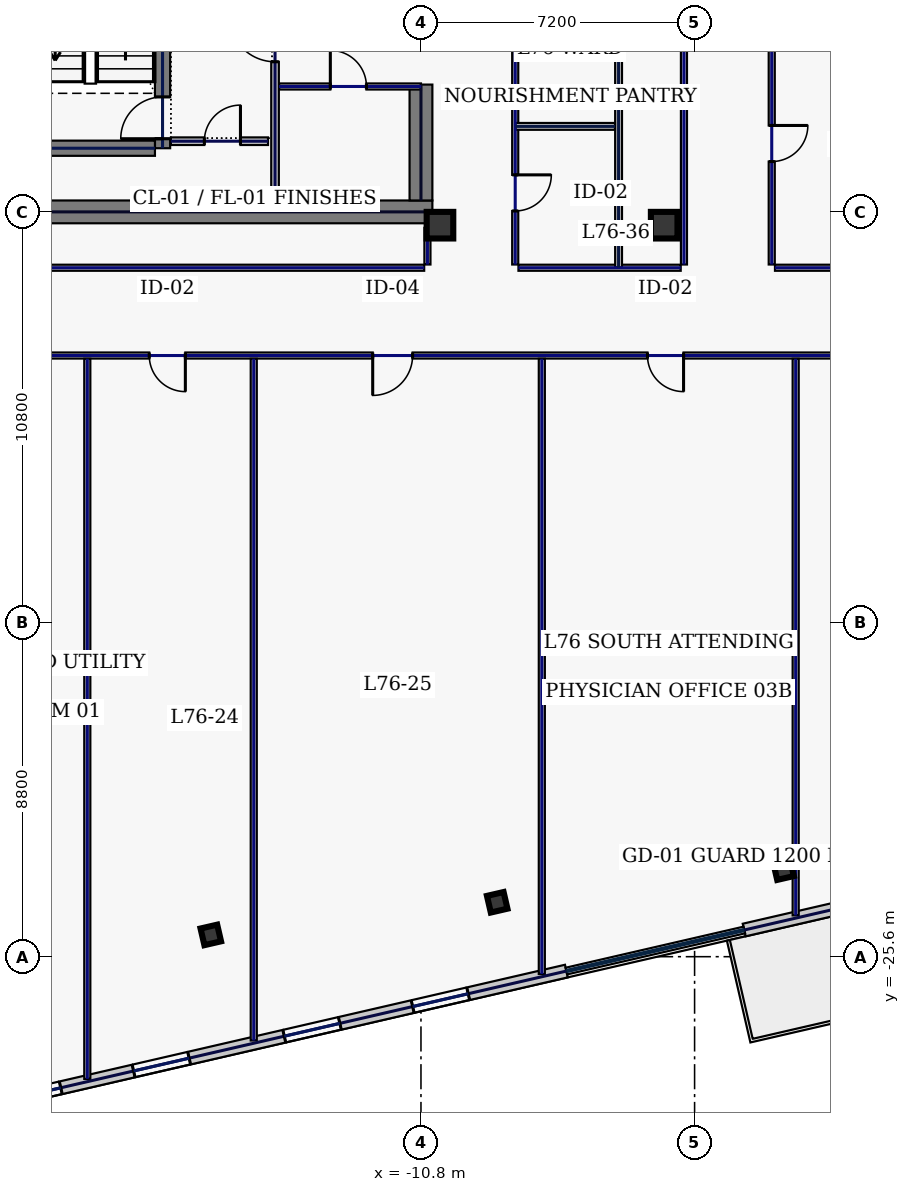
"""IFC4 building model, lengths in metres.
Left out: names, types, materials, properties, quantities, classifications, styles, units other than length and angle.
Written with IfcOpenShell. Run it as: python <this file> out.ifc"""

import sys

from ifc_helpers import new_model, si_unit, direction, frame, frame_2d, origin, origin_2d, place, context, subcontext, project, spatial, rectangle, hollow_rectangle, extrude, element, fill, save


model = new_model("IFC4")
c1 = context("Model", 3, precision=1e-05, world=origin(), true_north=direction((0.0, 1.0)))
c2 = subcontext(c1, "Body", "Model", "MODEL_VIEW")
j1 = project(units=[si_unit("LENGTHUNIT", "METRE"), si_unit("PLANEANGLEUNIT", "RADIAN")], contexts=[c1])
p1 = place(None, origin())
s1 = spatial("IfcSite", under=j1, at=p1, CompositionType="ELEMENT")
p2 = place(p1, origin())
s2 = spatial("IfcBuilding", under=s1, at=p2, CompositionType="ELEMENT")
p3 = place(p2, frame((0.0, 0.0, 325.0)))
s3 = spatial("IfcBuildingStorey", under=s2, at=p3, CompositionType="ELEMENT", Elevation=325.0)
p4 = place(p3, frame((-22.0, -6.0, 0.0), z_axis=(0.0, 0.0, 1.0), x_axis=(1.0, 0.0, 0.0)))
e1 = element("IfcWall", 1, at=p4, inside=s3, PredefinedType="SHEAR", context=c2, shape_type="SweptSolid", body=[
    extrude(rectangle(XDim=11.5, YDim=0.6, at=frame_2d((5.75, 0.0))), origin(), (0.0, 0.0, 1.0), 3.74),
])
p5 = place(p3, frame((-10.8, -5.7, 0.0), z_axis=(0.0, 0.0, 1.0), x_axis=(0.0, 1.0, 0.0)))
e2 = element("IfcWall", 2, at=p5, inside=s3, PredefinedType="SHEAR", context=c2, shape_type="SweptSolid", body=[
    extrude(rectangle(XDim=3.05, YDim=0.6, at=frame_2d((1.525, 0.0))), origin(), (0.0, 0.0, 1.0), 3.74),
])
p6 = place(p3, frame((-17.6, -4.325, 0.0), z_axis=(0.0, 0.0, 1.0), x_axis=(0.0, 1.0, 0.0)))
e3 = element("IfcWall", 3, at=p6, inside=s3, PredefinedType="SHEAR", context=c2, shape_type="SweptSolid", body=[
    extrude(rectangle(XDim=8.65, YDim=0.4, at=frame_2d((4.325, 0.0))), origin(), (0.0, 0.0, 1.0), 3.74),
])
p7 = place(p6, frame((0.25, 0.0, 0.0)))
e4 = element("IfcOpeningElement", 4, at=p7, cuts=e3, PredefinedType="OPENING", context=c2, shape_type="SweptSolid", body=[
    extrude(rectangle(XDim=1.1, YDim=2.2, at=frame_2d((0.55, 1.1))), frame((0.0, 0.21, 0.0), z_axis=(0.0, -1.0, 0.0), x_axis=(1.0, 0.0, 0.0)), (0.0, 0.0, 1.0), 0.42),
])
p8 = place(p3, frame((-21.2, -4.325, 0.0), z_axis=(0.0, 0.0, 1.0), x_axis=(1.0, 0.0, 0.0)))
e5 = element("IfcWall", 5, at=p8, inside=s3, PredefinedType="SHEAR", context=c2, shape_type="SweptSolid", body=[
    extrude(rectangle(XDim=3.4, YDim=0.4, at=frame_2d((1.7, 0.0))), origin(), (0.0, 0.0, 1.0), 3.74),
])
for number, where, z_axis, x_axis in (
    (6, (-10.3, -6.35, 0.0), (0.0, 0.0, 1.0), (1.0, 0.0, 0.0)),
    (7, (-4.4, -6.35, 0.0), (0.0, 0.0, 1.0), (1.0, 0.0, 0.0)),
):
    element("IfcColumn", number, at=place(p3, frame(where, z_axis=z_axis, x_axis=x_axis)), inside=s3, PredefinedType="COLUMN", context=c2, shape_type="SweptSolid", body=[
        extrude(hollow_rectangle(XDim=0.7, YDim=0.7, WallThickness=0.032, at=origin_2d()), origin(), (0.0, 0.0, 1.0), 3.74),
    ])
for number, where, z_axis, x_axis in (
    (8, (-16.33, -25.027, 0.0), (0.0, 0.0, 1.0), (0.974, 0.225, 0.0)),
    (9, (-8.794, -24.168, 0.0), (0.0, 0.0, 1.0), (0.974, 0.225, 0.0)),
    (10, (-1.258, -23.31, 0.0), (0.0, 0.0, 1.0), (0.974, 0.225, 0.0)),
):
    element("IfcColumn", number, at=place(p3, frame(where, z_axis=z_axis, x_axis=x_axis)), inside=s3, PredefinedType="COLUMN", context=c2, shape_type="SweptSolid", body=[
        extrude(hollow_rectangle(XDim=0.45, YDim=0.45, WallThickness=0.022, at=origin_2d()), origin(), (0.0, 0.0, 1.0), 3.74),
    ])
p9 = place(p3, frame((-24.03, -29.916, 0.0), z_axis=(0.0, 0.0, 1.0), x_axis=(0.974370978061, 0.224947098473, 0.0)))
e11 = element("IfcWall", 11, at=p9, inside=s3, PredefinedType="STANDARD", context=c2, shape_type="SweptSolid", body=[
    extrude(rectangle(XDim=17.506, YDim=0.34, at=frame_2d((8.753, 0.0))), origin(), (0.0, 0.0, 1.0), 3.74),
])
p10 = place(p9, frame((2.35, 0.0, 0.9)))
e12 = element("IfcOpeningElement", 12, at=p10, cuts=e11, PredefinedType="OPENING", context=c2, shape_type="SweptSolid", body=[
    extrude(rectangle(XDim=1.5, YDim=2.0, at=frame_2d((0.75, 1.0))), frame((0.0, 0.18, 0.0), z_axis=(0.0, -1.0, 0.0), x_axis=(1.0, 0.0, 0.0)), (0.0, 0.0, 1.0), 0.36),
])
p11 = place(p9, frame((5.817, 0.0, 0.9)))
e13 = element("IfcOpeningElement", 13, at=p11, cuts=e11, PredefinedType="OPENING", context=c2, shape_type="SweptSolid", body=[
    extrude(rectangle(XDim=1.5, YDim=2.0, at=frame_2d((0.75, 1.0))), frame((0.0, 0.18, 0.0), z_axis=(0.0, -1.0, 0.0), x_axis=(1.0, 0.0, 0.0)), (0.0, 0.0, 1.0), 0.36),
])
p12 = place(p9, frame((9.886, 0.0, 0.9)))
e14 = element("IfcOpeningElement", 14, at=p12, cuts=e11, PredefinedType="OPENING", context=c2, shape_type="SweptSolid", body=[
    extrude(rectangle(XDim=1.5, YDim=2.0, at=frame_2d((0.75, 1.0))), frame((0.0, 0.18, 0.0), z_axis=(0.0, -1.0, 0.0), x_axis=(1.0, 0.0, 0.0)), (0.0, 0.0, 1.0), 0.36),
])
p13 = place(p9, frame((13.353, 0.0, 0.9)))
e15 = element("IfcOpeningElement", 15, at=p13, cuts=e11, PredefinedType="OPENING", context=c2, shape_type="SweptSolid", body=[
    extrude(rectangle(XDim=1.5, YDim=2.0, at=frame_2d((0.75, 1.0))), frame((0.0, 0.18, 0.0), z_axis=(0.0, -1.0, 0.0), x_axis=(1.0, 0.0, 0.0)), (0.0, 0.0, 1.0), 0.36),
])
p14 = place(p3, frame((-2.295, -24.898, 0.0), z_axis=(0.0, 0.0, 1.0), x_axis=(0.974370872906, 0.224947553958, 0.0)))
e16 = element("IfcWall", 16, at=p14, inside=s3, PredefinedType="STANDARD", context=c2, shape_type="SweptSolid", body=[
    extrude(rectangle(XDim=10.328, YDim=0.34, at=frame_2d((5.164, 0.0))), origin(), (0.0, 0.0, 1.0), 3.74),
])
p15 = place(p14, frame((4.394, 0.0, 0.0)))
e17 = element("IfcOpeningElement", 17, at=p15, cuts=e16, PredefinedType="OPENING", context=c2, shape_type="SweptSolid", body=[
    extrude(rectangle(XDim=1.4, YDim=2.2, at=frame_2d((0.7, 1.1))), frame((0.0, 0.18, 0.0), z_axis=(0.0, -1.0, 0.0), x_axis=(1.0, 0.0, 0.0)), (0.0, 0.0, 1.0), 0.36),
])
p16 = place(p14, frame((2.655, 0.0, 0.9)))
e18 = element("IfcOpeningElement", 18, at=p16, cuts=e16, PredefinedType="OPENING", context=c2, shape_type="SweptSolid", body=[
    extrude(rectangle(XDim=0.85, YDim=1.85, at=frame_2d((0.425, 0.925))), frame((0.0, 0.18, 0.0), z_axis=(0.0, -1.0, 0.0), x_axis=(1.0, 0.0, 0.0)), (0.0, 0.0, 1.0), 0.36),
])
p17 = place(p14, frame((6.774, 0.0, 0.9)))
e19 = element("IfcOpeningElement", 19, at=p17, cuts=e16, PredefinedType="OPENING", context=c2, shape_type="SweptSolid", body=[
    extrude(rectangle(XDim=0.85, YDim=1.85, at=frame_2d((0.425, 0.925))), frame((0.0, 0.18, 0.0), z_axis=(0.0, -1.0, 0.0), x_axis=(1.0, 0.0, 0.0)), (0.0, 0.0, 1.0), 0.36),
])
p18 = place(p3, frame((-17.38, -4.14, 0.0), z_axis=(0.0, 0.0, 1.0), x_axis=(1.0, 0.0, 0.0)))
e20 = element("IfcWall", 20, at=p18, inside=s3, PredefinedType="SOLIDWALL", context=c2, shape_type="SweptSolid", body=[
    extrude(rectangle(XDim=2.555, YDim=0.2, at=frame_2d((1.277, 0.0))), origin(), (0.0, 0.0, 1.0), 3.74),
])
p19 = place(p18, frame((0.88, 0.0, 0.0)))
e21 = element("IfcOpeningElement", 21, at=p19, cuts=e20, PredefinedType="OPENING", context=c2, shape_type="SweptSolid", body=[
    extrude(rectangle(XDim=0.95, YDim=2.2, at=frame_2d((0.475, 1.1))), frame((0.0, 0.11, 0.0), z_axis=(0.0, -1.0, 0.0), x_axis=(1.0, 0.0, 0.0)), (0.0, 0.0, 1.0), 0.22),
])
p20 = place(p3, frame((-14.535, -2.7, 0.0), z_axis=(0.0, 0.0, 1.0), x_axis=(1.0, 0.0, 0.0)))
e22 = element("IfcWall", 22, at=p20, inside=s3, PredefinedType="PARTITIONING", context=c2, shape_type="SweptSolid", body=[
    extrude(rectangle(XDim=3.735, YDim=0.16, at=frame_2d((1.867, 0.0))), origin(), (0.0, 0.0, 1.0), 3.74),
])
p21 = place(p20, frame((1.35, 0.0, 0.0)))
e23 = element("IfcOpeningElement", 23, at=p21, cuts=e22, PredefinedType="OPENING", context=c2, shape_type="SweptSolid", body=[
    extrude(rectangle(XDim=0.95, YDim=2.2, at=frame_2d((0.475, 1.1))), frame((0.0, 0.09, 0.0), z_axis=(0.0, -1.0, 0.0), x_axis=(1.0, 0.0, 0.0)), (0.0, 0.0, 1.0), 0.18),
])
p22 = place(p3, frame((-14.64, -5.56, 0.0), z_axis=(0.0, 0.0, 1.0), x_axis=(0.0, 1.0, 0.0)))
e24 = element("IfcWall", 24, at=p22, inside=s3, PredefinedType="SOLIDWALL", context=c2, shape_type="SweptSolid", body=[
    extrude(rectangle(XDim=5.6, YDim=0.2, at=frame_2d((2.8, 0.0))), origin(), (0.0, 0.0, 1.0), 3.74),
])
p23 = place(p22, frame((3.51, 0.0, 0.0)))
e25 = element("IfcOpeningElement", 25, at=p23, cuts=e24, PredefinedType="OPENING", context=c2, shape_type="SweptSolid", body=[
    extrude(rectangle(XDim=1.2, YDim=2.2, at=frame_2d((0.6, 1.1))), frame((0.0, 0.11, 0.0), z_axis=(0.0, -1.0, 0.0), x_axis=(1.0, 0.0, 0.0)), (0.0, 0.0, 1.0), 0.22),
])
p24 = place(p3, frame((12.535, -9.78, 0.0), z_axis=(0.0, 0.0, 1.0), x_axis=(-1.0, 0.0, 0.0)))
e26 = element("IfcWall", 26, at=p24, inside=s3, PredefinedType="PARTITIONING", context=c2, shape_type="SweptSolid", body=[
    extrude(rectangle(XDim=36.68, YDim=0.16, at=frame_2d((18.34, 0.0))), origin(), (0.0, 0.0, 1.0), 3.74),
])
p25 = place(p24, frame((33.856, 0.0, 0.0)))
e27 = element("IfcOpeningElement", 27, at=p25, cuts=e26, PredefinedType="OPENING", context=c2, shape_type="SweptSolid", body=[
    extrude(rectangle(XDim=1.15, YDim=2.2, at=frame_2d((0.575, 1.1))), frame((0.0, 0.09, 0.0), z_axis=(0.0, -1.0, 0.0), x_axis=(1.0, 0.0, 0.0)), (0.0, 0.0, 1.0), 0.18),
])
p26 = place(p24, frame((29.535, 0.0, 0.0)))
e28 = element("IfcOpeningElement", 28, at=p26, cuts=e26, PredefinedType="OPENING", context=c2, shape_type="SweptSolid", body=[
    extrude(rectangle(XDim=0.95, YDim=2.2, at=frame_2d((0.475, 1.1))), frame((0.0, 0.09, 0.0), z_axis=(0.0, -1.0, 0.0), x_axis=(1.0, 0.0, 0.0)), (0.0, 0.0, 1.0), 0.18),
])
p27 = place(p24, frame((23.555, 0.0, 0.0)))
e29 = element("IfcOpeningElement", 29, at=p27, cuts=e26, PredefinedType="OPENING", context=c2, shape_type="SweptSolid", body=[
    extrude(rectangle(XDim=1.05, YDim=2.2, at=frame_2d((0.525, 1.1))), frame((0.0, 0.09, 0.0), z_axis=(0.0, -1.0, 0.0), x_axis=(1.0, 0.0, 0.0)), (0.0, 0.0, 1.0), 0.18),
])
p28 = place(p24, frame((16.425, 0.0, 0.0)))
e30 = element("IfcOpeningElement", 30, at=p28, cuts=e26, PredefinedType="OPENING", context=c2, shape_type="SweptSolid", body=[
    extrude(rectangle(XDim=0.95, YDim=2.2, at=frame_2d((0.475, 1.1))), frame((0.0, 0.09, 0.0), z_axis=(0.0, -1.0, 0.0), x_axis=(1.0, 0.0, 0.0)), (0.0, 0.0, 1.0), 0.18),
])
p29 = place(p24, frame((9.385, 0.0, 0.0)))
e31 = element("IfcOpeningElement", 31, at=p29, cuts=e26, PredefinedType="OPENING", context=c2, shape_type="SweptSolid", body=[
    extrude(rectangle(XDim=0.95, YDim=2.2, at=frame_2d((0.475, 1.1))), frame((0.0, 0.09, 0.0), z_axis=(0.0, -1.0, 0.0), x_axis=(1.0, 0.0, 0.0)), (0.0, 0.0, 1.0), 0.18),
])
p30 = place(p24, frame((2.624, 0.0, 0.0)))
e32 = element("IfcOpeningElement", 32, at=p30, cuts=e26, PredefinedType="OPENING", context=c2, shape_type="SweptSolid", body=[
    extrude(rectangle(XDim=1.3, YDim=2.2, at=frame_2d((0.65, 1.1))), frame((0.0, 0.09, 0.0), z_axis=(0.0, -1.0, 0.0), x_axis=(1.0, 0.0, 0.0)), (0.0, 0.0, 1.0), 0.18),
])
p31 = place(p3, frame((-1.57, 7.435, 0.0), z_axis=(0.0, 0.0, 1.0), x_axis=(0.0, -1.0, 0.0)))
e33 = element("IfcWall", 33, at=p31, inside=s3, PredefinedType="PARTITIONING", context=c2, shape_type="SweptSolid", body=[
    extrude(rectangle(XDim=14.82, YDim=0.16, at=frame_2d((7.41, 0.0))), origin(), (0.0, 0.0, 1.0), 3.74),
])
p32 = place(p31, frame((11.161, 0.0, 0.0)))
e34 = element("IfcOpeningElement", 34, at=p32, cuts=e33, PredefinedType="OPENING", context=c2, shape_type="SweptSolid", body=[
    extrude(rectangle(XDim=0.95, YDim=2.2, at=frame_2d((0.475, 1.1))), frame((0.0, 0.09, 0.0), z_axis=(0.0, -1.0, 0.0), x_axis=(1.0, 0.0, 0.0)), (0.0, 0.0, 1.0), 0.18),
])
p33 = place(p31, frame((4.054, 0.0, 0.0)))
e35 = element("IfcOpeningElement", 35, at=p33, cuts=e33, PredefinedType="OPENING", context=c2, shape_type="SweptSolid", body=[
    extrude(rectangle(XDim=0.95, YDim=2.2, at=frame_2d((0.475, 1.1))), frame((0.0, 0.09, 0.0), z_axis=(0.0, -1.0, 0.0), x_axis=(1.0, 0.0, 0.0)), (0.0, 0.0, 1.0), 0.18),
])
p34 = place(p3, frame((-1.485, -7.47, 0.0), z_axis=(0.0, 0.0, 1.0), x_axis=(1.0, 0.0, 0.0)))
e36 = element("IfcWall", 36, at=p34, inside=s3, PredefinedType="PARTITIONING", context=c2, shape_type="SweptSolid", body=[
    extrude(rectangle(XDim=9.72, YDim=0.16, at=frame_2d((4.86, 0.0))), origin(), (0.0, 0.0, 1.0), 3.74),
])
p35 = place(p34, frame((7.561, 0.0, 0.0)))
e37 = element("IfcOpeningElement", 37, at=p35, cuts=e36, PredefinedType="OPENING", context=c2, shape_type="SweptSolid", body=[
    extrude(rectangle(XDim=0.95, YDim=2.2, at=frame_2d((0.475, 1.1))), frame((0.0, 0.09, 0.0), z_axis=(0.0, -1.0, 0.0), x_axis=(1.0, 0.0, 0.0)), (0.0, 0.0, 1.0), 0.18),
])
p36 = place(p3, frame((-3.88, -7.385, 0.0), z_axis=(0.0, 0.0, 1.0), x_axis=(0.0, 1.0, 0.0)))
e38 = element("IfcWall", 38, at=p36, inside=s3, PredefinedType="PARTITIONING", context=c2, shape_type="SweptSolid", body=[
    extrude(rectangle(XDim=14.82, YDim=0.16, at=frame_2d((7.41, 0.0))), origin(), (0.0, 0.0, 1.0), 3.74),
])
p37 = place(p3, frame((-8.32, 7.435, 0.0), z_axis=(0.0, 0.0, 1.0), x_axis=(0.0, -1.0, 0.0)))
e39 = element("IfcWall", 39, at=p37, inside=s3, PredefinedType="PARTITIONING", context=c2, shape_type="SweptSolid", body=[
    extrude(rectangle(XDim=14.82, YDim=0.16, at=frame_2d((7.41, 0.0))), origin(), (0.0, 0.0, 1.0), 3.74),
])
p38 = place(p37, frame((12.461, 0.0, 0.0)))
e40 = element("IfcOpeningElement", 40, at=p38, cuts=e39, PredefinedType="OPENING", context=c2, shape_type="SweptSolid", body=[
    extrude(rectangle(XDim=0.95, YDim=2.2, at=frame_2d((0.475, 1.1))), frame((0.0, 0.09, 0.0), z_axis=(0.0, -1.0, 0.0), x_axis=(1.0, 0.0, 0.0)), (0.0, 0.0, 1.0), 0.18),
])
p39 = place(p37, frame((5.354, 0.0, 0.0)))
e41 = element("IfcOpeningElement", 41, at=p39, cuts=e39, PredefinedType="OPENING", context=c2, shape_type="SweptSolid", body=[
    extrude(rectangle(XDim=0.95, YDim=2.2, at=frame_2d((0.475, 1.1))), frame((0.0, 0.09, 0.0), z_axis=(0.0, -1.0, 0.0), x_axis=(1.0, 0.0, 0.0)), (0.0, 0.0, 1.0), 0.18),
])
p40 = place(p3, frame((-8.235, -7.47, 0.0), z_axis=(0.0, 0.0, 1.0), x_axis=(1.0, 0.0, 0.0)))
e42 = element("IfcWall", 42, at=p40, inside=s3, PredefinedType="PARTITIONING", context=c2, shape_type="SweptSolid", body=[
    extrude(rectangle(XDim=4.27, YDim=0.16, at=frame_2d((2.135, 0.0))), origin(), (0.0, 0.0, 1.0), 3.74),
])
p41 = place(p3, frame((-10.63, -7.385, 0.0), z_axis=(0.0, 0.0, 1.0), x_axis=(0.0, 1.0, 0.0)))
e43 = element("IfcWall", 43, at=p41, inside=s3, PredefinedType="PARTITIONING", context=c2, shape_type="SweptSolid", body=[
    extrude(rectangle(XDim=0.965, YDim=0.16, at=frame_2d((0.482, 0.0))), origin(), (0.0, 0.0, 1.0), 3.74),
])
p42 = place(p3, frame((-21.915, -7.47, 0.0), z_axis=(0.0, 0.0, 1.0), x_axis=(1.0, 0.0, 0.0)))
e44 = element("IfcWall", 44, at=p42, inside=s3, PredefinedType="PARTITIONING", context=c2, shape_type="SweptSolid", body=[
    extrude(rectangle(XDim=11.2, YDim=0.16, at=frame_2d((5.6, 0.0))), origin(), (0.0, 0.0, 1.0), 3.74),
])
p43 = place(p3, frame((-19.58, -28.817, 0.0), z_axis=(0.0, 0.0, 1.0), x_axis=(0.0, 1.0, 0.0)))
e45 = element("IfcWall", 45, at=p43, inside=s3, PredefinedType="PARTITIONING", context=c2, shape_type="SweptSolid", body=[
    extrude(rectangle(XDim=18.952, YDim=0.16, at=frame_2d((9.476, 0.0))), origin(), (0.0, 0.0, 1.0), 3.74),
])
p44 = place(p3, frame((-15.2, -27.806, 0.0), z_axis=(0.0, 0.0, 1.0), x_axis=(0.0, 1.0, 0.0)))
e46 = element("IfcWall", 46, at=p44, inside=s3, PredefinedType="PARTITIONING", context=c2, shape_type="SweptSolid", body=[
    extrude(rectangle(XDim=17.941, YDim=0.16, at=frame_2d((8.97, 0.0))), origin(), (0.0, 0.0, 1.0), 3.74),
])
p45 = place(p3, frame((-0.94, -24.514, 0.0), z_axis=(0.0, 0.0, 1.0), x_axis=(0.0, 1.0, 0.0)))
e47 = element("IfcWall", 47, at=p45, inside=s3, PredefinedType="PARTITIONING", context=c2, shape_type="SweptSolid", body=[
    extrude(rectangle(XDim=14.649, YDim=0.16, at=frame_2d((7.324, 0.0))), origin(), (0.0, 0.0, 1.0), 3.74),
])
p46 = place(p3, frame((-7.62, -26.056, 0.0), z_axis=(0.0, 0.0, 1.0), x_axis=(0.0, 1.0, 0.0)))
e48 = element("IfcWall", 48, at=p46, inside=s3, PredefinedType="PARTITIONING", context=c2, shape_type="SweptSolid", body=[
    extrude(rectangle(XDim=16.191, YDim=0.16, at=frame_2d((8.095, 0.0))), origin(), (0.0, 0.0, 1.0), 3.74),
])
p47 = place(p3, frame((-5.6, -7.465, 0.0), z_axis=(0.0, 0.0, 1.0), x_axis=(0.0, 1.0, 0.0)))
e49 = element("IfcWall", 49, at=p47, inside=s3, PredefinedType="PARTITIONING", context=c2, shape_type="SweptSolid", body=[
    extrude(rectangle(XDim=14.98, YDim=0.18, at=frame_2d((7.49, 0.0))), origin(), (0.0, 0.0, 1.0), 3.74),
])
p48 = place(p3, frame((-8.315, -3.75, 0.0), z_axis=(0.0, 0.0, 1.0), x_axis=(1.0, 0.0, 0.0)))
e50 = element("IfcWall", 50, at=p48, inside=s3, PredefinedType="PARTITIONING", context=c2, shape_type="SweptSolid", body=[
    extrude(rectangle(XDim=2.62, YDim=0.18, at=frame_2d((1.31, 0.0))), origin(), (0.0, 0.0, 1.0), 3.74),
])
p49 = place(p10, origin())
e51 = element("IfcWindow", 51, at=p49, inside=s3, PartitioningType="SINGLE_PANEL", PredefinedType="WINDOW", context=c2, shape_type="SweptSolid", body=[
    extrude(rectangle(XDim=1.5, YDim=2.0, at=frame_2d((0.75, 1.0))), frame((0.0, 0.03, 0.0), z_axis=(0.0, -1.0, 0.0), x_axis=(1.0, 0.0, 0.0)), (0.0, 0.0, 1.0), 0.06),
])
fill(e12, e51)
p50 = place(p11, origin())
e52 = element("IfcWindow", 52, at=p50, inside=s3, PartitioningType="SINGLE_PANEL", PredefinedType="WINDOW", context=c2, shape_type="SweptSolid", body=[
    extrude(rectangle(XDim=1.5, YDim=2.0, at=frame_2d((0.75, 1.0))), frame((0.0, 0.03, 0.0), z_axis=(0.0, -1.0, 0.0), x_axis=(1.0, 0.0, 0.0)), (0.0, 0.0, 1.0), 0.06),
])
fill(e13, e52)
p51 = place(p12, origin())
e53 = element("IfcWindow", 53, at=p51, inside=s3, PartitioningType="SINGLE_PANEL", PredefinedType="WINDOW", context=c2, shape_type="SweptSolid", body=[
    extrude(rectangle(XDim=1.5, YDim=2.0, at=frame_2d((0.75, 1.0))), frame((0.0, 0.03, 0.0), z_axis=(0.0, -1.0, 0.0), x_axis=(1.0, 0.0, 0.0)), (0.0, 0.0, 1.0), 0.06),
])
fill(e14, e53)
p52 = place(p13, origin())
e54 = element("IfcWindow", 54, at=p52, inside=s3, PartitioningType="SINGLE_PANEL", PredefinedType="WINDOW", context=c2, shape_type="SweptSolid", body=[
    extrude(rectangle(XDim=1.5, YDim=2.0, at=frame_2d((0.75, 1.0))), frame((0.0, 0.03, 0.0), z_axis=(0.0, -1.0, 0.0), x_axis=(1.0, 0.0, 0.0)), (0.0, 0.0, 1.0), 0.06),
])
fill(e15, e54)
p53 = place(p7, origin())
e55 = element("IfcDoor", 55, at=p53, inside=s3, OperationType="SINGLE_SWING_LEFT", PredefinedType="DOOR", context=c2, shape_type="SweptSolid", body=[
    extrude(rectangle(XDim=1.1, YDim=2.2, at=frame_2d((0.55, 1.1))), frame((0.0, 0.025, 0.0), z_axis=(0.0, -1.0, 0.0), x_axis=(1.0, 0.0, 0.0)), (0.0, 0.0, 1.0), 0.05),
])
fill(e4, e55)
p54 = place(p19, origin())
e56 = element("IfcDoor", 56, at=p54, inside=s3, OperationType="SINGLE_SWING_RIGHT", PredefinedType="DOOR", context=c2, shape_type="SweptSolid", body=[
    extrude(rectangle(XDim=0.95, YDim=2.2, at=frame_2d((0.475, 1.1))), frame((0.0, 0.025, 0.0), z_axis=(0.0, -1.0, 0.0), x_axis=(1.0, 0.0, 0.0)), (0.0, 0.0, 1.0), 0.05),
])
fill(e21, e56)
p55 = place(p21, origin())
e57 = element("IfcDoor", 57, at=p55, inside=s3, OperationType="SINGLE_SWING_LEFT", PredefinedType="DOOR", context=c2, shape_type="SweptSolid", body=[
    extrude(rectangle(XDim=0.95, YDim=2.2, at=frame_2d((0.475, 1.1))), frame((0.0, 0.025, 0.0), z_axis=(0.0, -1.0, 0.0), x_axis=(1.0, 0.0, 0.0)), (0.0, 0.0, 1.0), 0.05),
])
fill(e23, e57)
p56 = place(p23, origin())
e58 = element("IfcDoor", 58, at=p56, inside=s3, OperationType="SINGLE_SWING_RIGHT", PredefinedType="DOOR", context=c2, shape_type="SweptSolid", body=[
    extrude(rectangle(XDim=1.2, YDim=2.2, at=frame_2d((0.6, 1.1))), frame((0.0, 0.025, 0.0), z_axis=(0.0, -1.0, 0.0), x_axis=(1.0, 0.0, 0.0)), (0.0, 0.0, 1.0), 0.05),
])
fill(e25, e58)
p57 = place(p26, origin())
e59 = element("IfcDoor", 59, at=p57, inside=s3, OperationType="SINGLE_SWING_LEFT", PredefinedType="DOOR", context=c2, shape_type="SweptSolid", body=[
    extrude(rectangle(XDim=0.95, YDim=2.2, at=frame_2d((0.475, 1.1))), frame((0.0, 0.025, 0.0), z_axis=(0.0, -1.0, 0.0), x_axis=(1.0, 0.0, 0.0)), (0.0, 0.0, 1.0), 0.05),
])
fill(e28, e59)
p58 = place(p27, origin())
e60 = element("IfcDoor", 60, at=p58, inside=s3, OperationType="SINGLE_SWING_RIGHT", PredefinedType="DOOR", context=c2, shape_type="SweptSolid", body=[
    extrude(rectangle(XDim=1.05, YDim=2.2, at=frame_2d((0.525, 1.1))), frame((0.0, 0.025, 0.0), z_axis=(0.0, -1.0, 0.0), x_axis=(1.0, 0.0, 0.0)), (0.0, 0.0, 1.0), 0.05),
])
fill(e29, e60)
p59 = place(p28, origin())
e61 = element("IfcDoor", 61, at=p59, inside=s3, OperationType="SINGLE_SWING_LEFT", PredefinedType="DOOR", context=c2, shape_type="SweptSolid", body=[
    extrude(rectangle(XDim=0.95, YDim=2.2, at=frame_2d((0.475, 1.1))), frame((0.0, 0.025, 0.0), z_axis=(0.0, -1.0, 0.0), x_axis=(1.0, 0.0, 0.0)), (0.0, 0.0, 1.0), 0.05),
])
fill(e30, e61)
p60 = place(p38, origin())
e62 = element("IfcDoor", 62, at=p60, inside=s3, OperationType="SINGLE_SWING_LEFT", PredefinedType="DOOR", context=c2, shape_type="SweptSolid", body=[
    extrude(rectangle(XDim=0.95, YDim=2.2, at=frame_2d((0.475, 1.1))), frame((0.0, 0.025, 0.0), z_axis=(0.0, -1.0, 0.0), x_axis=(1.0, 0.0, 0.0)), (0.0, 0.0, 1.0), 0.05),
])
fill(e40, e62)
p61 = place(p32, origin())
e63 = element("IfcDoor", 63, at=p61, inside=s3, OperationType="SINGLE_SWING_LEFT", PredefinedType="DOOR", context=c2, shape_type="SweptSolid", body=[
    extrude(rectangle(XDim=0.95, YDim=2.2, at=frame_2d((0.475, 1.1))), frame((0.0, 0.025, 0.0), z_axis=(0.0, -1.0, 0.0), x_axis=(1.0, 0.0, 0.0)), (0.0, 0.0, 1.0), 0.05),
])
fill(e34, e63)
save(model, sys.argv[1])
